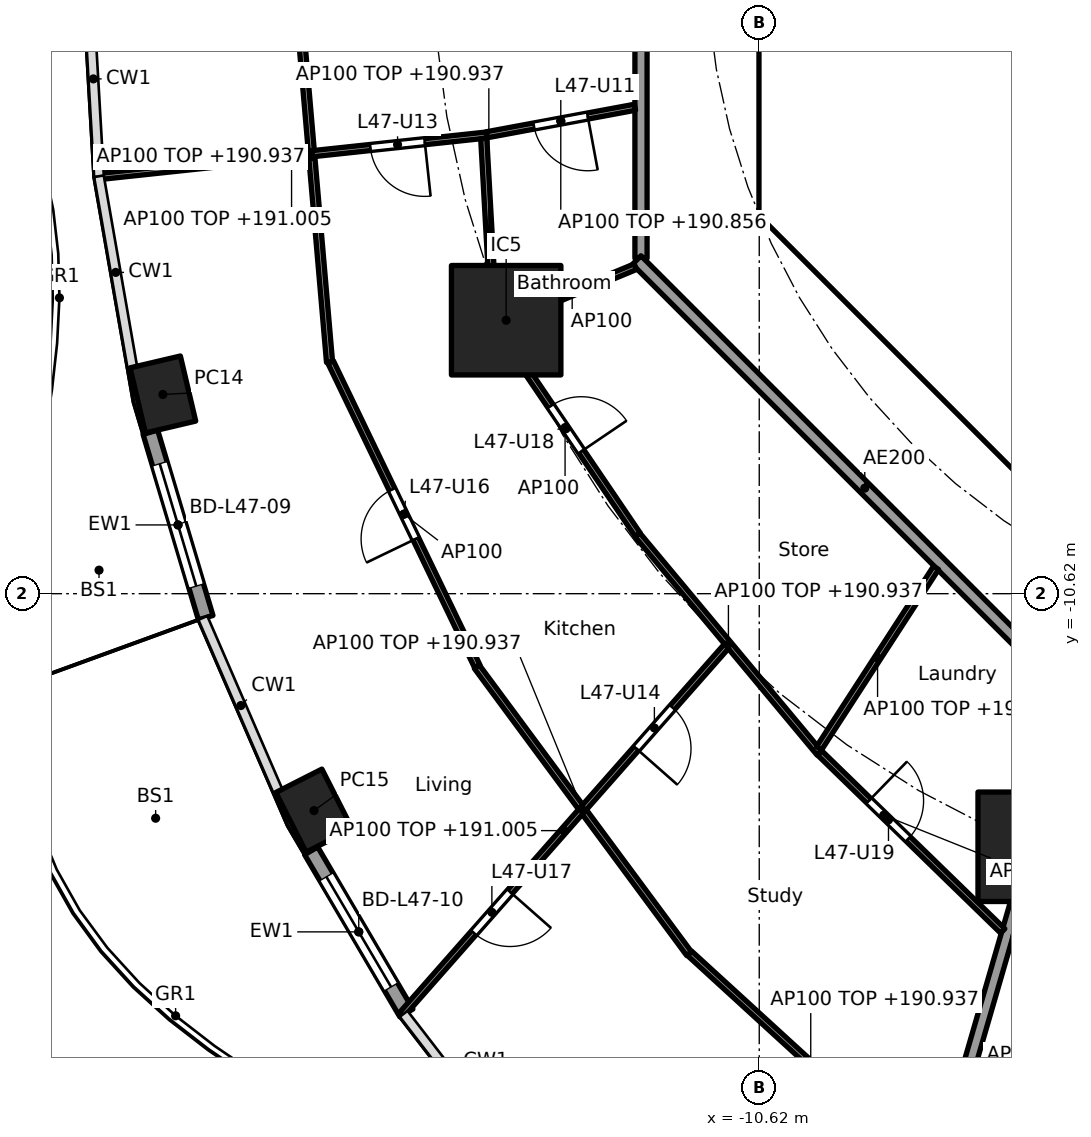
"""IFC4 building model, lengths in metres.
Left out: names, types, materials, properties, quantities, classifications, styles, units other than length and angle.
Written with IfcOpenShell. Run it as: python <this file> out.ifc"""

import sys

from ifc_helpers import new_model, si_unit, direction, frame, frame_2d, origin, origin_2d, place, context, subcontext, project, spatial, polyline, rectangle, hollow_rectangle, outline, extrude, element, fill, save


model = new_model("IFC4")
c1 = context("Model", 3, precision=1e-05, world=origin(), true_north=direction((0.0, 1.0)))
c2 = subcontext(c1, "Body", "Model", "MODEL_VIEW")
j1 = project(units=[si_unit("LENGTHUNIT", "METRE"), si_unit("PLANEANGLEUNIT", "RADIAN")], contexts=[c1])
p1 = place(None, origin())
s1 = spatial("IfcSite", under=j1, at=p1, CompositionType="ELEMENT")
p2 = place(p1, origin())
s2 = spatial("IfcBuilding", under=s1, at=p2, CompositionType="ELEMENT")
p3 = place(p2, frame((0.0, 0.0, 188.1)))
s3 = spatial("IfcBuildingStorey", under=s2, at=p3, CompositionType="ELEMENT", Elevation=188.1)
for number, where, z_axis, x_axis in (
    (1, (-20.427, -7.344, 0.0), (0.0, 0.0, 1.0), (0.229, -0.973, 0.0)),
    (2, (-17.942, -14.188, 0.0), (0.0, 0.0, 1.0), (0.452, -0.892, 0.0)),
):
    element("IfcColumn", number, at=place(p3, frame(where, z_axis=z_axis, x_axis=x_axis)), inside=s3, PredefinedType="COLUMN", context=c2, shape_type="SweptSolid", body=[
        extrude(hollow_rectangle(XDim=1.1, YDim=0.85, WallThickness=0.036, at=origin_2d()), origin(), (0.0, 0.0, 1.0), 3.7),
    ])
for number, where, z_axis, x_axis in (
    (3, (-14.782, -6.123, 0.0), (0.0, 0.0, 1.0), (1.0, 0.0, 0.0)),
    (4, (-6.123, -14.782, 0.0), (0.0, 0.0, 1.0), (1.0, 0.0, 0.0)),
):
    element("IfcColumn", number, at=place(p3, frame(where, z_axis=z_axis, x_axis=x_axis)), inside=s3, PredefinedType="COLUMN", context=c2, shape_type="SweptSolid", body=[
        extrude(rectangle(XDim=1.8, YDim=1.8, at=origin_2d()), origin(), (0.0, 0.0, 1.0), 3.7),
    ])
p4 = place(p3, frame((-19.724, -11.014, 0.0), z_axis=(0.0, 0.0, 1.0), x_axis=(-0.28584838049, 0.958274857946, 0.0)))
e5 = element("IfcWall", 5, at=p4, inside=s3, PredefinedType="SOLIDWALL", context=c2, shape_type="SweptSolid", body=[
    extrude(rectangle(XDim=3.182, YDim=0.25, at=frame_2d((1.591, 0.0))), origin(), (0.0, 0.0, 1.0), 3.44),
])
p5 = place(p4, frame((0.541, 0.0, 0.0)))
e6 = element("IfcOpeningElement", 6, at=p5, cuts=e5, PredefinedType="OPENING", context=c2, shape_type="SweptSolid", body=[
    extrude(rectangle(XDim=2.1, YDim=2.4, at=frame_2d((1.05, 1.2))), frame((0.0, 0.135, 0.0), z_axis=(0.0, -1.0, 0.0), x_axis=(1.0, 0.0, 0.0)), (0.0, 0.0, 1.0), 0.27),
])
p6 = place(p3, frame((-16.424, -17.515, 0.0), z_axis=(0.0, 0.0, 1.0), x_axis=(-0.506309086483, 0.862352079458, 0.0)))
e7 = element("IfcWall", 7, at=p6, inside=s3, PredefinedType="SOLIDWALL", context=c2, shape_type="SweptSolid", body=[
    extrude(rectangle(XDim=3.092, YDim=0.25, at=frame_2d((1.546, 0.0))), origin(), (0.0, 0.0, 1.0), 3.44),
])
p7 = place(p6, frame((0.496, 0.0, 0.0)))
e8 = element("IfcOpeningElement", 8, at=p7, cuts=e7, PredefinedType="OPENING", context=c2, shape_type="SweptSolid", body=[
    extrude(rectangle(XDim=2.1, YDim=2.4, at=frame_2d((1.05, 1.2))), frame((0.0, 0.135, 0.0), z_axis=(0.0, -1.0, 0.0), x_axis=(1.0, 0.0, 0.0)), (0.0, 0.0, 1.0), 0.27),
])
p8 = place(p3, frame((-10.325, 3.801, 0.0), z_axis=(0.0, 0.0, 1.0), x_axis=(0.0, -1.0, 0.0)))
e9 = element("IfcWall", 9, at=p8, inside=s3, PredefinedType="SHEAR", context=c2, shape_type="SweptSolid", body=[
    extrude(rectangle(XDim=7.602, YDim=0.6, at=frame_2d((3.801, 0.0))), origin(), (0.0, 0.0, 1.0), 3.44),
])
p9 = place(p8, frame((0.651, 0.0, 0.0)))
e10 = element("IfcOpeningElement", 10, at=p9, cuts=e9, PredefinedType="OPENING", context=c2, shape_type="SweptSolid", body=[
    extrude(rectangle(XDim=1.5, YDim=2.1, at=frame_2d((0.75, 1.05))), frame((0.0, 0.31, 0.0), z_axis=(0.0, -1.0, 0.0), x_axis=(1.0, 0.0, 0.0)), (0.0, 0.0, 1.0), 0.62),
])
p10 = place(p8, frame((5.451, 0.0, 0.0)))
e11 = element("IfcOpeningElement", 11, at=p10, cuts=e9, PredefinedType="OPENING", context=c2, shape_type="SweptSolid", body=[
    extrude(rectangle(XDim=1.5, YDim=2.1, at=frame_2d((0.75, 1.05))), frame((0.0, 0.31, 0.0), z_axis=(0.0, -1.0, 0.0), x_axis=(1.0, 0.0, 0.0)), (0.0, 0.0, 1.0), 0.62),
])
p11 = place(p3, frame((-9.988, -4.613, 0.0), z_axis=(0.0, 0.0, 1.0), x_axis=(0.707106781187, -0.707106781187, 0.0)))
e12 = element("IfcWall", 12, at=p11, inside=s3, PredefinedType="SHEAR", context=c2, shape_type="SweptSolid", body=[
    extrude(rectangle(XDim=7.602, YDim=0.6, at=frame_2d((3.801, 0.0))), origin(), (0.0, 0.0, 1.0), 3.44),
])
p12 = place(p11, frame((6.151, 0.0, 0.0)))
e13 = element("IfcOpeningElement", 13, at=p12, cuts=e12, PredefinedType="OPENING", context=c2, shape_type="SweptSolid", body=[
    extrude(rectangle(XDim=1.1, YDim=2.1, at=frame_2d((0.55, 1.05))), frame((0.0, 0.31, 0.0), z_axis=(0.0, -1.0, 0.0), x_axis=(1.0, 0.0, 0.0)), (0.0, 0.0, 1.0), 0.62),
])
p13 = place(p3, frame((-7.4, -6.627, 0.0), z_axis=(0.0, 0.0, 1.0), x_axis=(0.0, 1.0, 0.0)))
e14 = element("IfcWall", 14, at=p13, inside=s3, PredefinedType="PARTITIONING", context=c2, shape_type="SweptSolid", body=[
    extrude(rectangle(XDim=2.527, YDim=0.15, at=frame_2d((1.263, 0.0))), origin(), (0.0, 0.0, 1.0), 3.44),
])
p14 = place(p13, frame((0.776, 0.0, 0.0)))
e15 = element("IfcOpeningElement", 15, at=p14, cuts=e14, PredefinedType="OPENING", context=c2, shape_type="SweptSolid", body=[
    extrude(rectangle(XDim=0.9, YDim=2.1, at=frame_2d((0.45, 1.05))), frame((0.0, 0.085, 0.0), z_axis=(0.0, -1.0, 0.0), x_axis=(1.0, 0.0, 0.0)), (0.0, 0.0, 1.0), 0.17),
])
p15 = place(p3, frame((-6.7, -2.0, 0.0), z_axis=(0.0, 0.0, 1.0), x_axis=(1.0, 0.0, 0.0)))
e16 = element("IfcWall", 16, at=p15, inside=s3, PredefinedType="SOLIDWALL", context=c2, shape_type="SweptSolid", body=[
    extrude(rectangle(XDim=13.4, YDim=0.2, at=frame_2d((6.7, 0.0))), origin(), (0.0, 0.0, 1.0), 3.44),
])
p16 = place(p15, frame((5.05, 0.0, 0.0)))
e17 = element("IfcOpeningElement", 17, at=p16, cuts=e16, PredefinedType="OPENING", context=c2, shape_type="SweptSolid", body=[
    extrude(rectangle(XDim=1.1, YDim=2.1, at=frame_2d((0.55, 1.05))), frame((0.0, 0.11, 0.0), z_axis=(0.0, -1.0, 0.0), x_axis=(1.0, 0.0, 0.0)), (0.0, 0.0, 1.0), 0.22),
])
p17 = place(p15, frame((7.25, 0.0, 0.0)))
e18 = element("IfcOpeningElement", 18, at=p17, cuts=e16, PredefinedType="OPENING", context=c2, shape_type="SweptSolid", body=[
    extrude(rectangle(XDim=1.1, YDim=2.1, at=frame_2d((0.55, 1.05))), frame((0.0, 0.11, 0.0), z_axis=(0.0, -1.0, 0.0), x_axis=(1.0, 0.0, 0.0)), (0.0, 0.0, 1.0), 0.22),
])
p18 = place(p15, frame((1.85, 0.0, 0.0)))
e19 = element("IfcOpeningElement", 19, at=p18, cuts=e16, PredefinedType="OPENING", context=c2, shape_type="SweptSolid", body=[
    extrude(rectangle(XDim=0.9, YDim=2.1, at=frame_2d((0.45, 1.05))), frame((0.0, 0.11, 0.0), z_axis=(0.0, -1.0, 0.0), x_axis=(1.0, 0.0, 0.0)), (0.0, 0.0, 1.0), 0.22),
])
p19 = place(p3, origin())
e20 = element("IfcWall", 20, at=p19, inside=s3, PredefinedType="SHEAR", context=c2, shape_type="SweptSolid", body=[
    extrude(outline(polyline([(-10.625, -3.801), (-10.025, -3.801), (-10.025, -4.152), (-9.776, -4.401), (-10.2, -4.825), (-10.625, -4.401), (-10.625, -3.801)])), origin(), (0.0, 0.0, 1.0), 3.44),
])
p20 = place(p3, frame((-10.025, -4.0, 0.0), z_axis=(0.0, 0.0, 1.0), x_axis=(1.0, 0.0, 0.0)))
e21 = element("IfcWall", 21, at=p20, inside=s3, PredefinedType="PARTITIONING", context=c2, shape_type="SweptSolid", body=[
    extrude(rectangle(XDim=3.325, YDim=0.2, at=frame_2d((1.662, 0.0))), origin(), (0.0, 0.0, 1.0), 3.44),
])
p21 = place(p3, origin())
e22 = element("IfcWall", 22, at=p21, inside=s3, PredefinedType="SOLIDWALL", context=c2, shape_type="SweptSolid", body=[
    extrude(outline(polyline([(-6.7, -2.1), (-6.5, -2.1), (-6.5, -4.1), (-2.3, -4.1), (-2.3, -2.1), (-2.1, -2.1), (-2.1, -4.1), (-0.1, -4.1), (-0.1, -2.1), (0.1, -2.1), (0.1, -4.1), (2.1, -4.1), (2.1, -2.1), (2.3, -2.1), (2.3, -4.1), (4.3, -4.1), (4.3, -2.1), (4.5, -2.1), (4.5, -4.1), (6.5, -4.1), (6.5, -2.1), (6.7, -2.1), (6.7, -4.3), (-6.7, -4.3), (-6.7, -2.1)])), origin(), (0.0, 0.0, 1.0), 3.44),
])
p22 = place(p3, frame((-6.137, -14.83, 0.0), z_axis=(0.0, 0.0, 1.0), x_axis=(-0.278461169897, -0.96044748782, 0.0)))
e23 = element("IfcWall", 23, at=p22, inside=s3, PredefinedType="PARTITIONING", context=c2, shape_type="SweptSolid", body=[
    extrude(rectangle(XDim=9.573, YDim=0.2, at=frame_2d((4.787, 0.0))), origin(), (0.0, 0.0, 1.0), 2.837),
])
p23 = place(p3, frame((-12.565, 5.304, 0.0), z_axis=(0.0, 0.0, 1.0), x_axis=(0.0, -1.0, 0.0)))
e24 = element("IfcWall", 24, at=p23, inside=s3, PredefinedType="PARTITIONING", context=c2, shape_type="SweptSolid", body=[
    extrude(rectangle(XDim=10.409, YDim=0.2, at=frame_2d((5.205, 0.0))), origin(), (0.0, 0.0, 1.0), 3.44),
])
p24 = place(p23, frame((4.804, 0.0, 0.0)))
e25 = element("IfcOpeningElement", 25, at=p24, cuts=e24, PredefinedType="OPENING", context=c2, shape_type="SweptSolid", body=[
    extrude(rectangle(XDim=1.0, YDim=2.1, at=frame_2d((0.5, 1.05))), frame((0.0, 0.11, 0.0), z_axis=(0.0, -1.0, 0.0), x_axis=(1.0, 0.0, 0.0)), (0.0, 0.0, 1.0), 0.22),
])
p25 = place(p3, frame((-12.635, -5.134, 0.0), z_axis=(0.0, 0.0, 1.0), x_axis=(0.707106781187, -0.707106781187, 0.0)))
e26 = element("IfcWall", 26, at=p25, inside=s3, PredefinedType="PARTITIONING", context=c2, shape_type="SweptSolid", body=[
    extrude(rectangle(XDim=10.609, YDim=0.2, at=frame_2d((5.305, 0.0))), origin(), (0.0, 0.0, 1.0), 3.44),
])
p26 = place(p3, frame((-18.271, -0.05, 0.0), z_axis=(0.0, 0.0, 1.0), x_axis=(0.086018199227, -0.996293565874, 0.0)))
e27 = element("IfcWall", 27, at=p26, inside=s3, PredefinedType="PARTITIONING", context=c2, shape_type="SweptSolid", body=[
    extrude(rectangle(XDim=6.789, YDim=0.1, at=frame_2d((3.395, 0.0))), origin(), (0.0, 0.0, 1.0), 2.837),
])
p27 = place(p3, frame((-12.663, -2.621, 0.0), z_axis=(0.0, 0.0, 1.0), x_axis=(-0.983176884312, -0.182655999505, 0.0)))
e28 = element("IfcWall", 28, at=p27, inside=s3, PredefinedType="PARTITIONING", context=c2, shape_type="SweptSolid", body=[
    extrude(rectangle(XDim=2.483, YDim=0.1, at=frame_2d((1.242, 0.0))), origin(), (0.0, 0.0, 1.0), 2.756),
])
p28 = place(p27, frame((0.792, 0.0, 0.0)))
e29 = element("IfcOpeningElement", 29, at=p28, cuts=e28, PredefinedType="OPENING", context=c2, shape_type="SweptSolid", body=[
    extrude(rectangle(XDim=0.9, YDim=2.1, at=frame_2d((0.45, 1.05))), frame((0.0, 0.06, 0.0), z_axis=(0.0, -1.0, 0.0), x_axis=(1.0, 0.0, 0.0)), (0.0, 0.0, 1.0), 0.12),
])
p29 = place(p3, frame((-15.104, -3.078, 0.0), z_axis=(0.0, 0.0, 1.0), x_axis=(-0.994316167803, -0.106467640365, 0.0)))
e30 = element("IfcWall", 30, at=p29, inside=s3, PredefinedType="PARTITIONING", context=c2, shape_type="SweptSolid", body=[
    extrude(rectangle(XDim=6.45, YDim=0.1, at=frame_2d((3.225, 0.0))), origin(), (0.0, 0.0, 1.0), 2.905),
])
p30 = place(p29, frame((1.022, 0.0, 0.0)))
e31 = element("IfcOpeningElement", 31, at=p30, cuts=e30, PredefinedType="OPENING", context=c2, shape_type="SweptSolid", body=[
    extrude(rectangle(XDim=0.9, YDim=2.1, at=frame_2d((0.45, 1.05))), frame((0.0, 0.06, 0.0), z_axis=(0.0, -1.0, 0.0), x_axis=(1.0, 0.0, 0.0)), (0.0, 0.0, 1.0), 0.12),
])
p31 = place(p3, frame((-15.151, -3.133, 0.0), z_axis=(0.0, 0.0, 1.0), x_axis=(0.05637501378, -0.998409664327, 0.0)))
e32 = element("IfcWall", 32, at=p31, inside=s3, PredefinedType="PARTITIONING", context=c2, shape_type="SweptSolid", body=[
    extrude(rectangle(XDim=2.988, YDim=0.1, at=frame_2d((1.494, 0.0))), origin(), (0.0, 0.0, 1.0), 2.837),
])
p32 = place(p3, frame((-12.657, -5.243, 0.0), z_axis=(0.0, 0.0, 1.0), x_axis=(-0.923864733477, -0.382719158442, 0.0)))
e33 = element("IfcWall", 33, at=p32, inside=s3, PredefinedType="PARTITIONING", context=c2, shape_type="SweptSolid", body=[
    extrude(rectangle(XDim=2.25, YDim=0.1, at=frame_2d((1.125, 0.0))), origin(), (0.0, 0.0, 1.0), 3.44),
])
p33 = place(p3, frame((-15.008, -6.125, 0.0), z_axis=(0.0, 0.0, 1.0), x_axis=(0.561073758086, -0.827765811076, 0.0)))
e34 = element("IfcWall", 34, at=p33, inside=s3, PredefinedType="PARTITIONING", context=c2, shape_type="SweptSolid", body=[
    extrude(rectangle(XDim=4.259, YDim=0.1, at=frame_2d((2.129, 0.0))), origin(), (0.0, 0.0, 1.0), 3.44),
])
p34 = place(p33, frame((1.704, 0.0, 0.0)))
e35 = element("IfcOpeningElement", 35, at=p34, cuts=e34, PredefinedType="OPENING", context=c2, shape_type="SweptSolid", body=[
    extrude(rectangle(XDim=0.9, YDim=2.1, at=frame_2d((0.45, 1.05))), frame((0.0, 0.06, 0.0), z_axis=(0.0, -1.0, 0.0), x_axis=(1.0, 0.0, 0.0)), (0.0, 0.0, 1.0), 0.12),
])
p35 = place(p3, frame((-17.669, -6.809, 0.0), z_axis=(0.0, 0.0, 1.0), x_axis=(0.434040130629, -0.900893536997, 0.0)))
e36 = element("IfcWall", 36, at=p35, inside=s3, PredefinedType="PARTITIONING", context=c2, shape_type="SweptSolid", body=[
    extrude(rectangle(XDim=5.558, YDim=0.1, at=frame_2d((2.779, 0.0))), origin(), (0.0, 0.0, 1.0), 3.44),
])
p36 = place(p35, frame((2.329, 0.0, 0.0)))
e37 = element("IfcOpeningElement", 37, at=p36, cuts=e36, PredefinedType="OPENING", context=c2, shape_type="SweptSolid", body=[
    extrude(rectangle(XDim=0.9, YDim=2.1, at=frame_2d((0.45, 1.05))), frame((0.0, 0.06, 0.0), z_axis=(0.0, -1.0, 0.0), x_axis=(1.0, 0.0, 0.0)), (0.0, 0.0, 1.0), 0.12),
])
p37 = place(p3, frame((-12.623, -9.653, 0.0), z_axis=(0.0, 0.0, 1.0), x_axis=(0.640297481347, -0.768127030758, 0.0)))
e38 = element("IfcWall", 38, at=p37, inside=s3, PredefinedType="PARTITIONING", context=c2, shape_type="SweptSolid", body=[
    extrude(rectangle(XDim=4.672, YDim=0.1, at=frame_2d((2.336, 0.0))), origin(), (0.0, 0.0, 1.0), 2.837),
])
p38 = place(p3, frame((-15.265, -11.821, 0.0), z_axis=(0.0, 0.0, 1.0), x_axis=(0.594711348772, -0.803939308432, 0.0)))
e39 = element("IfcWall", 39, at=p38, inside=s3, PredefinedType="PARTITIONING", context=c2, shape_type="SweptSolid", body=[
    extrude(rectangle(XDim=5.872, YDim=0.1, at=frame_2d((2.936, 0.0))), origin(), (0.0, 0.0, 1.0), 2.837),
])
p39 = place(p3, frame((-11.16, -11.485, 0.0), z_axis=(0.0, 0.0, 1.0), x_axis=(-0.661275898802, -0.750142776852, 0.0)))
e40 = element("IfcWall", 40, at=p39, inside=s3, PredefinedType="PARTITIONING", context=c2, shape_type="SweptSolid", body=[
    extrude(rectangle(XDim=8.083, YDim=0.1, at=frame_2d((4.041, 0.0))), origin(), (0.0, 0.0, 1.0), 2.905),
])
p40 = place(p39, frame((1.341, 0.0, 0.0)))
e41 = element("IfcOpeningElement", 41, at=p40, cuts=e40, PredefinedType="OPENING", context=c2, shape_type="SweptSolid", body=[
    extrude(rectangle(XDim=0.9, YDim=2.1, at=frame_2d((0.45, 1.05))), frame((0.0, 0.06, 0.0), z_axis=(0.0, -1.0, 0.0), x_axis=(1.0, 0.0, 0.0)), (0.0, 0.0, 1.0), 0.12),
])
p41 = place(p39, frame((5.382, 0.0, 0.0)))
e42 = element("IfcOpeningElement", 42, at=p41, cuts=e40, PredefinedType="OPENING", context=c2, shape_type="SweptSolid", body=[
    extrude(rectangle(XDim=0.9, YDim=2.1, at=frame_2d((0.45, 1.05))), frame((0.0, 0.06, 0.0), z_axis=(0.0, -1.0, 0.0), x_axis=(1.0, 0.0, 0.0)), (0.0, 0.0, 1.0), 0.12),
])
p42 = place(p3, frame((-7.712, -10.195, 0.0), z_axis=(0.0, 0.0, 1.0), x_axis=(-0.544170086001, -0.838974920663, 0.0)))
e43 = element("IfcWall", 43, at=p42, inside=s3, PredefinedType="PARTITIONING", context=c2, shape_type="SweptSolid", body=[
    extrude(rectangle(XDim=3.535, YDim=0.1, at=frame_2d((1.768, 0.0))), origin(), (0.0, 0.0, 1.0), 2.756),
])
p43 = place(p3, frame((-9.627, -13.238, 0.0), z_axis=(0.0, 0.0, 1.0), x_axis=(0.716919058692, -0.697156412352, 0.0)))
e44 = element("IfcWall", 44, at=p43, inside=s3, PredefinedType="PARTITIONING", context=c2, shape_type="SweptSolid", body=[
    extrude(rectangle(XDim=4.2, YDim=0.1, at=frame_2d((2.1, 0.0))), origin(), (0.0, 0.0, 1.0), 2.837),
])
p44 = place(p43, frame((1.13, 0.0, 0.0)))
e45 = element("IfcOpeningElement", 45, at=p44, cuts=e44, PredefinedType="OPENING", context=c2, shape_type="SweptSolid", body=[
    extrude(rectangle(XDim=0.9, YDim=2.1, at=frame_2d((0.45, 1.05))), frame((0.0, 0.06, 0.0), z_axis=(0.0, -1.0, 0.0), x_axis=(1.0, 0.0, 0.0)), (0.0, 0.0, 1.0), 0.12),
])
p45 = place(p3, frame((-11.766, -16.535, 0.0), z_axis=(0.0, 0.0, 1.0), x_axis=(0.73807320557, -0.674720640872, 0.0)))
e46 = element("IfcWall", 46, at=p45, inside=s3, PredefinedType="PARTITIONING", context=c2, shape_type="SweptSolid", body=[
    extrude(rectangle(XDim=5.399, YDim=0.1, at=frame_2d((2.699, 0.0))), origin(), (0.0, 0.0, 1.0), 2.837),
])
p46 = place(p5, origin())
e47 = element("IfcDoor", 47, at=p46, inside=s3, OperationType="SLIDING_TO_LEFT", PredefinedType="DOOR", context=c2, shape_type="SweptSolid", body=[
    extrude(rectangle(XDim=2.1, YDim=2.4, at=frame_2d((1.05, 1.2))), frame((0.0, 0.025, 0.0), z_axis=(0.0, -1.0, 0.0), x_axis=(1.0, 0.0, 0.0)), (0.0, 0.0, 1.0), 0.05),
])
fill(e6, e47)
p47 = place(p7, origin())
e48 = element("IfcDoor", 48, at=p47, inside=s3, OperationType="SLIDING_TO_LEFT", PredefinedType="DOOR", context=c2, shape_type="SweptSolid", body=[
    extrude(rectangle(XDim=2.1, YDim=2.4, at=frame_2d((1.05, 1.2))), frame((0.0, 0.025, 0.0), z_axis=(0.0, -1.0, 0.0), x_axis=(1.0, 0.0, 0.0)), (0.0, 0.0, 1.0), 0.05),
])
fill(e8, e48)
p48 = place(p14, origin())
e49 = element("IfcDoor", 49, at=p48, inside=s3, OperationType="SINGLE_SWING_LEFT", PredefinedType="DOOR", context=c2, shape_type="SweptSolid", body=[
    extrude(rectangle(XDim=0.9, YDim=2.1, at=frame_2d((0.45, 1.05))), frame((0.0, 0.025, 0.0), z_axis=(0.0, -1.0, 0.0), x_axis=(1.0, 0.0, 0.0)), (0.0, 0.0, 1.0), 0.05),
])
fill(e15, e49)
p49 = place(p10, origin())
e50 = element("IfcDoor", 50, at=p49, inside=s3, OperationType="DOUBLE_DOOR_SINGLE_SWING", PredefinedType="DOOR", context=c2, shape_type="SweptSolid", body=[
    extrude(rectangle(XDim=1.5, YDim=2.1, at=frame_2d((0.75, 1.05))), frame((0.0, 0.025, 0.0), z_axis=(0.0, -1.0, 0.0), x_axis=(1.0, 0.0, 0.0)), (0.0, 0.0, 1.0), 0.05),
])
fill(e11, e50)
p50 = place(p28, origin())
e51 = element("IfcDoor", 51, at=p50, inside=s3, OperationType="SINGLE_SWING_LEFT", PredefinedType="DOOR", context=c2, shape_type="SweptSolid", body=[
    extrude(rectangle(XDim=0.9, YDim=2.1, at=frame_2d((0.45, 1.05))), frame((0.0, 0.025, 0.0), z_axis=(0.0, -1.0, 0.0), x_axis=(1.0, 0.0, 0.0)), (0.0, 0.0, 1.0), 0.05),
])
fill(e29, e51)
p51 = place(p30, origin())
e52 = element("IfcDoor", 52, at=p51, inside=s3, OperationType="SINGLE_SWING_LEFT", PredefinedType="DOOR", context=c2, shape_type="SweptSolid", body=[
    extrude(rectangle(XDim=0.9, YDim=2.1, at=frame_2d((0.45, 1.05))), frame((0.0, 0.025, 0.0), z_axis=(0.0, -1.0, 0.0), x_axis=(1.0, 0.0, 0.0)), (0.0, 0.0, 1.0), 0.05),
])
fill(e31, e52)
p52 = place(p40, origin())
e53 = element("IfcDoor", 53, at=p52, inside=s3, OperationType="SINGLE_SWING_RIGHT", PredefinedType="DOOR", context=c2, shape_type="SweptSolid", body=[
    extrude(rectangle(XDim=0.9, YDim=2.1, at=frame_2d((0.45, 1.05))), frame((0.0, 0.025, 0.0), z_axis=(0.0, -1.0, 0.0), x_axis=(1.0, 0.0, 0.0)), (0.0, 0.0, 1.0), 0.05),
])
fill(e41, e53)
p53 = place(p36, frame((0.9, 0.0, 0.0), x_axis=(-1.0, 0.0, 0.0)))
e54 = element("IfcDoor", 54, at=p53, inside=s3, OperationType="SINGLE_SWING_LEFT", PredefinedType="DOOR", context=c2, shape_type="SweptSolid", body=[
    extrude(rectangle(XDim=0.9, YDim=2.1, at=frame_2d((0.45, 1.05))), frame((0.0, 0.025, 0.0), z_axis=(0.0, -1.0, 0.0), x_axis=(1.0, 0.0, 0.0)), (0.0, 0.0, 1.0), 0.05),
])
fill(e37, e54)
p54 = place(p41, origin())
e55 = element("IfcDoor", 55, at=p54, inside=s3, OperationType="SINGLE_SWING_LEFT", PredefinedType="DOOR", context=c2, shape_type="SweptSolid", body=[
    extrude(rectangle(XDim=0.9, YDim=2.1, at=frame_2d((0.45, 1.05))), frame((0.0, 0.025, 0.0), z_axis=(0.0, -1.0, 0.0), x_axis=(1.0, 0.0, 0.0)), (0.0, 0.0, 1.0), 0.05),
])
fill(e42, e55)
p55 = place(p34, origin())
e56 = element("IfcDoor", 56, at=p55, inside=s3, OperationType="SINGLE_SWING_RIGHT", PredefinedType="DOOR", context=c2, shape_type="SweptSolid", body=[
    extrude(rectangle(XDim=0.9, YDim=2.1, at=frame_2d((0.45, 1.05))), frame((0.0, 0.025, 0.0), z_axis=(0.0, -1.0, 0.0), x_axis=(1.0, 0.0, 0.0)), (0.0, 0.0, 1.0), 0.05),
])
fill(e35, e56)
p56 = place(p44, origin())
e57 = element("IfcDoor", 57, at=p56, inside=s3, OperationType="SINGLE_SWING_LEFT", PredefinedType="DOOR", context=c2, shape_type="SweptSolid", body=[
    extrude(rectangle(XDim=0.9, YDim=2.1, at=frame_2d((0.45, 1.05))), frame((0.0, 0.025, 0.0), z_axis=(0.0, -1.0, 0.0), x_axis=(1.0, 0.0, 0.0)), (0.0, 0.0, 1.0), 0.05),
])
fill(e45, e57)
save(model, sys.argv[1])
